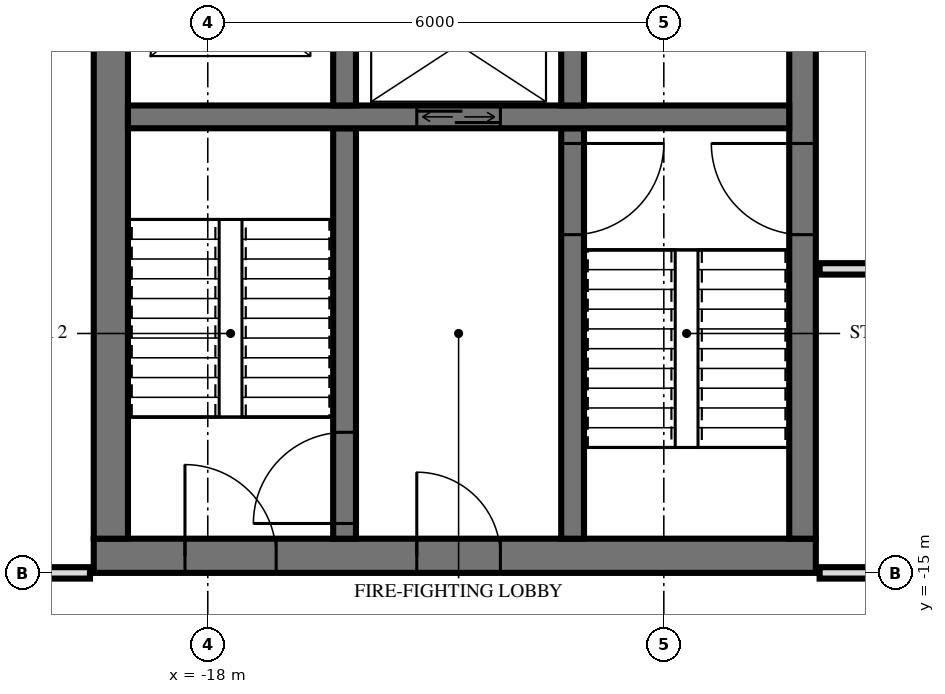
"""IFC4 building model, lengths in metres.
Left out: names, types, materials, properties, quantities, classifications, styles, units other than length and angle.
Written with IfcOpenShell. Run it as: python <this file> out.ifc"""

import sys

from ifc_helpers import new_model, si_unit, direction, frame, frame_2d, origin, place, context, subcontext, project, spatial, rectangle, extrude, element, fill, save


model = new_model("IFC4")
c1 = context("Model", 3, precision=1e-05, world=origin(), true_north=direction((0.0, 1.0)))
c2 = subcontext(c1, "Body", "Model", "MODEL_VIEW")
j1 = project(units=[si_unit("LENGTHUNIT", "METRE"), si_unit("PLANEANGLEUNIT", "RADIAN")], contexts=[c1])
p1 = place(None, origin())
s1 = spatial("IfcSite", under=j1, at=p1, CompositionType="ELEMENT")
p2 = place(p1, origin())
s2 = spatial("IfcBuilding", under=s1, at=p2, CompositionType="ELEMENT")
p3 = place(p2, frame((0.0, 0.0, 326.6)))
s3 = spatial("IfcBuildingStorey", under=s2, at=p3, CompositionType="ELEMENT", Elevation=326.6)
p4 = place(p3, frame((-19.5, -14.775, 0.0), z_axis=(0.0, 0.0, 1.0), x_axis=(1.0, 0.0, 0.0)))
e1 = element("IfcWall", 1, at=p4, inside=s3, PredefinedType="SHEAR", context=c2, shape_type="SweptSolid", body=[
    extrude(rectangle(XDim=9.5, YDim=0.45, at=frame_2d((4.75, 0.0))), origin(), (0.0, 0.0, 1.0), 4.0),
])
p5 = place(p4, frame((1.2, 0.0, 0.0)))
e2 = element("IfcOpeningElement", 2, at=p5, cuts=e1, PredefinedType="OPENING", context=c2, shape_type="SweptSolid", body=[
    extrude(rectangle(XDim=1.2, YDim=2.1, at=frame_2d((0.6, 1.05))), frame((0.0, 0.235, 0.0), z_axis=(0.0, -1.0, 0.0), x_axis=(1.0, 0.0, 0.0)), (0.0, 0.0, 1.0), 0.47),
])
p6 = place(p4, frame((4.25, 0.0, 0.0)))
e3 = element("IfcOpeningElement", 3, at=p6, cuts=e1, PredefinedType="OPENING", context=c2, shape_type="SweptSolid", body=[
    extrude(rectangle(XDim=1.1, YDim=2.1, at=frame_2d((0.55, 1.05))), frame((0.0, 0.235, 0.0), z_axis=(0.0, -1.0, 0.0), x_axis=(1.0, 0.0, 0.0)), (0.0, 0.0, 1.0), 0.47),
])
p7 = place(p3, frame((-10.175, -14.55, 0.0), z_axis=(0.0, 0.0, 1.0), x_axis=(0.0, 1.0, 0.0)))
e4 = element("IfcWall", 4, at=p7, inside=s3, PredefinedType="SHEAR", context=c2, shape_type="SweptSolid", body=[
    extrude(rectangle(XDim=14.1, YDim=0.35, at=frame_2d((7.05, 0.0))), origin(), (0.0, 0.0, 1.0), 4.0),
])
p8 = place(p7, frame((8.4, 0.0, 0.0)))
e5 = element("IfcOpeningElement", 5, at=p8, cuts=e4, PredefinedType="OPENING", context=c2, shape_type="SweptSolid", body=[
    extrude(rectangle(XDim=1.4, YDim=2.4, at=frame_2d((0.7, 1.2))), frame((0.0, 0.185, 0.0), z_axis=(0.0, -1.0, 0.0), x_axis=(1.0, 0.0, 0.0)), (0.0, 0.0, 1.0), 0.37),
])
p9 = place(p7, frame((10.0, 0.0, 0.0)))
e6 = element("IfcOpeningElement", 6, at=p9, cuts=e4, PredefinedType="OPENING", context=c2, shape_type="SweptSolid", body=[
    extrude(rectangle(XDim=1.4, YDim=2.4, at=frame_2d((0.7, 1.2))), frame((0.0, 0.185, 0.0), z_axis=(0.0, -1.0, 0.0), x_axis=(1.0, 0.0, 0.0)), (0.0, 0.0, 1.0), 0.37),
])
p10 = place(p7, frame((4.0, 0.0, 0.0)))
e7 = element("IfcOpeningElement", 7, at=p10, cuts=e4, PredefinedType="OPENING", context=c2, shape_type="SweptSolid", body=[
    extrude(rectangle(XDim=1.2, YDim=2.1, at=frame_2d((0.6, 1.05))), frame((0.0, 0.185, 0.0), z_axis=(0.0, -1.0, 0.0), x_axis=(1.0, 0.0, 0.0)), (0.0, 0.0, 1.0), 0.37),
])
p11 = place(p3, frame((-19.275, -14.55, 0.0), z_axis=(0.0, 0.0, 1.0), x_axis=(0.0, 1.0, 0.0)))
e8 = element("IfcWall", 8, at=p11, inside=s3, PredefinedType="SHEAR", context=c2, shape_type="SweptSolid", body=[
    extrude(rectangle(XDim=14.1, YDim=0.45, at=frame_2d((7.05, 0.0))), origin(), (0.0, 0.0, 1.0), 4.0),
])
p12 = place(p3, frame((-19.05, -9.0, 0.0), z_axis=(0.0, 0.0, 1.0), x_axis=(1.0, 0.0, 0.0)))
e9 = element("IfcWall", 9, at=p12, inside=s3, PredefinedType="SHEAR", context=c2, shape_type="SweptSolid", body=[
    extrude(rectangle(XDim=8.7, YDim=0.3, at=frame_2d((4.35, 0.0))), origin(), (0.0, 0.0, 1.0), 4.0),
])
p13 = place(p12, frame((3.8, 0.0, 0.0)))
e10 = element("IfcOpeningElement", 10, at=p13, cuts=e9, PredefinedType="OPENING", context=c2, shape_type="SweptSolid", body=[
    extrude(rectangle(XDim=1.1, YDim=2.1, at=frame_2d((0.55, 1.05))), frame((0.0, 0.16, 0.0), z_axis=(0.0, -1.0, 0.0), x_axis=(1.0, 0.0, 0.0)), (0.0, 0.0, 1.0), 0.32),
])
p14 = place(p3, frame((-13.2, -8.85, 0.0), z_axis=(0.0, 0.0, 1.0), x_axis=(0.0, 1.0, 0.0)))
e11 = element("IfcWall", 11, at=p14, inside=s3, PredefinedType="SHEAR", context=c2, shape_type="SweptSolid", body=[
    extrude(rectangle(XDim=2.3, YDim=0.3, at=frame_2d((1.15, 0.0))), origin(), (0.0, 0.0, 1.0), 4.0),
])
p15 = place(p3, frame((-13.2, -14.55, 0.0), z_axis=(0.0, 0.0, 1.0), x_axis=(0.0, 1.0, 0.0)))
e12 = element("IfcWall", 12, at=p15, inside=s3, PredefinedType="SHEAR", context=c2, shape_type="SweptSolid", body=[
    extrude(rectangle(XDim=5.4, YDim=0.3, at=frame_2d((2.7, 0.0))), origin(), (0.0, 0.0, 1.0), 4.0),
])
p16 = place(p15, frame((4.0, 0.0, 0.0)))
e13 = element("IfcOpeningElement", 13, at=p16, cuts=e12, PredefinedType="OPENING", context=c2, shape_type="SweptSolid", body=[
    extrude(rectangle(XDim=1.2, YDim=2.1, at=frame_2d((0.6, 1.05))), frame((0.0, 0.16, 0.0), z_axis=(0.0, -1.0, 0.0), x_axis=(1.0, 0.0, 0.0)), (0.0, 0.0, 1.0), 0.32),
])
p17 = place(p3, frame((-16.2, -8.85, 0.0), z_axis=(0.0, 0.0, 1.0), x_axis=(0.0, 1.0, 0.0)))
e14 = element("IfcWall", 14, at=p17, inside=s3, PredefinedType="SHEAR", context=c2, shape_type="SweptSolid", body=[
    extrude(rectangle(XDim=2.3, YDim=0.3, at=frame_2d((1.15, 0.0))), origin(), (0.0, 0.0, 1.0), 4.0),
])
p18 = place(p3, frame((-16.2, -14.55, 0.0), z_axis=(0.0, 0.0, 1.0), x_axis=(0.0, 1.0, 0.0)))
e15 = element("IfcWall", 15, at=p18, inside=s3, PredefinedType="SHEAR", context=c2, shape_type="SweptSolid", body=[
    extrude(rectangle(XDim=5.4, YDim=0.3, at=frame_2d((2.7, 0.0))), origin(), (0.0, 0.0, 1.0), 4.0),
])
p19 = place(p18, frame((0.2, 0.0, 0.0)))
e16 = element("IfcOpeningElement", 16, at=p19, cuts=e15, PredefinedType="OPENING", context=c2, shape_type="SweptSolid", body=[
    extrude(rectangle(XDim=1.2, YDim=2.1, at=frame_2d((0.6, 1.05))), frame((0.0, 0.16, 0.0), z_axis=(0.0, -1.0, 0.0), x_axis=(1.0, 0.0, 0.0)), (0.0, 0.0, 1.0), 0.32),
])
p20 = place(p3, frame((-21.935, -15.0, 0.0), z_axis=(0.0, 0.0, 1.0), x_axis=(1.0, 0.0, 0.0)))
e17 = element("IfcWall", 17, at=p20, inside=s3, PredefinedType="PARTITIONING", context=c2, shape_type="SweptSolid", body=[
    extrude(rectangle(XDim=2.385, YDim=0.15, at=frame_2d((1.192, 0.0))), origin(), (0.0, 0.0, 1.0), 3.72),
])
p21 = place(p20, frame((0.627, 0.0, 0.0)))
e18 = element("IfcOpeningElement", 18, at=p21, cuts=e17, PredefinedType="OPENING", context=c2, shape_type="SweptSolid", body=[
    extrude(rectangle(XDim=1.0, YDim=2.1, at=frame_2d((0.5, 1.05))), frame((0.0, 0.085, 0.0), z_axis=(0.0, -1.0, 0.0), x_axis=(1.0, 0.0, 0.0)), (0.0, 0.0, 1.0), 0.17),
])
p22 = place(p3, frame((-9.95, -15.0, 0.0), z_axis=(0.0, 0.0, 1.0), x_axis=(1.0, 0.0, 0.0)))
e19 = element("IfcWall", 19, at=p22, inside=s3, PredefinedType="PARTITIONING", context=c2, shape_type="SweptSolid", body=[
    extrude(rectangle(XDim=2.642, YDim=0.15, at=frame_2d((1.321, 0.0))), origin(), (0.0, 0.0, 1.0), 3.084),
])
p23 = place(p3, frame((-9.95, -11.0, 0.0), z_axis=(0.0, 0.0, 1.0), x_axis=(1.0, 0.0, 0.0)))
e20 = element("IfcWall", 20, at=p23, inside=s3, PredefinedType="PARTITIONING", context=c2, shape_type="SweptSolid", body=[
    extrude(rectangle(XDim=19.9, YDim=0.15, at=frame_2d((9.95, 0.0))), origin(), (0.0, 0.0, 1.0), 3.72),
])
p24 = place(p23, frame((9.45, 0.0, 0.0)))
e21 = element("IfcOpeningElement", 21, at=p24, cuts=e20, PredefinedType="OPENING", context=c2, shape_type="SweptSolid", body=[
    extrude(rectangle(XDim=1.0, YDim=2.1, at=frame_2d((0.5, 1.05))), frame((0.0, 0.085, 0.0), z_axis=(0.0, -1.0, 0.0), x_axis=(1.0, 0.0, 0.0)), (0.0, 0.0, 1.0), 0.17),
])
p25 = place(p23, frame((2.2, 0.0, 0.0)))
e22 = element("IfcOpeningElement", 22, at=p25, cuts=e20, PredefinedType="OPENING", context=c2, shape_type="SweptSolid", body=[
    extrude(rectangle(XDim=1.0, YDim=2.1, at=frame_2d((0.5, 1.05))), frame((0.0, 0.085, 0.0), z_axis=(0.0, -1.0, 0.0), x_axis=(1.0, 0.0, 0.0)), (0.0, 0.0, 1.0), 0.17),
])
p26 = place(p13, origin())
e23 = element("IfcDoor", 23, at=p26, inside=s3, OperationType="DOUBLE_DOOR_SLIDING", PredefinedType="USERDEFINED", context=c2, shape_type="SweptSolid", body=[
    extrude(rectangle(XDim=1.1, YDim=2.1, at=frame_2d((0.55, 1.05))), frame((0.0, 0.025, 0.0), z_axis=(0.0, -1.0, 0.0), x_axis=(1.0, 0.0, 0.0)), (0.0, 0.0, 1.0), 0.05),
])
fill(e10, e23)
p27 = place(p10, origin())
e24 = element("IfcDoor", 24, at=p27, inside=s3, OperationType="SINGLE_SWING_LEFT", PredefinedType="DOOR", context=c2, shape_type="SweptSolid", body=[
    extrude(rectangle(XDim=1.2, YDim=2.1, at=frame_2d((0.6, 1.05))), frame((0.0, 0.025, 0.0), z_axis=(0.0, -1.0, 0.0), x_axis=(1.0, 0.0, 0.0)), (0.0, 0.0, 1.0), 0.05),
])
fill(e7, e24)
p28 = place(p5, origin())
e25 = element("IfcDoor", 25, at=p28, inside=s3, OperationType="SINGLE_SWING_RIGHT", PredefinedType="DOOR", context=c2, shape_type="SweptSolid", body=[
    extrude(rectangle(XDim=1.2, YDim=2.1, at=frame_2d((0.6, 1.05))), frame((0.0, 0.025, 0.0), z_axis=(0.0, -1.0, 0.0), x_axis=(1.0, 0.0, 0.0)), (0.0, 0.0, 1.0), 0.05),
])
fill(e2, e25)
p29 = place(p6, origin())
e26 = element("IfcDoor", 26, at=p29, inside=s3, OperationType="SINGLE_SWING_RIGHT", PredefinedType="DOOR", context=c2, shape_type="SweptSolid", body=[
    extrude(rectangle(XDim=1.1, YDim=2.1, at=frame_2d((0.55, 1.05))), frame((0.0, 0.025, 0.0), z_axis=(0.0, -1.0, 0.0), x_axis=(1.0, 0.0, 0.0)), (0.0, 0.0, 1.0), 0.05),
])
fill(e3, e26)
p30 = place(p16, frame((0.6, 0.0, 0.0), z_axis=(0.0, 0.0, 1.0), x_axis=(-1.0, 0.0, 0.0)))
e27 = element("IfcDoor", 27, at=p30, inside=s3, OperationType="SINGLE_SWING_RIGHT", PredefinedType="DOOR", context=c2, shape_type="SweptSolid", body=[
    extrude(rectangle(XDim=1.2, YDim=2.1, at=frame_2d((0.0, 1.05))), frame((0.0, -0.025, 0.0), z_axis=(0.0, 1.0, 0.0), x_axis=(-1.0, 0.0, 0.0)), (0.0, 0.0, 1.0), 0.05),
])
fill(e13, e27)
p31 = place(p19, origin())
e28 = element("IfcDoor", 28, at=p31, inside=s3, OperationType="SINGLE_SWING_RIGHT", PredefinedType="DOOR", context=c2, shape_type="SweptSolid", body=[
    extrude(rectangle(XDim=1.2, YDim=2.1, at=frame_2d((0.6, 1.05))), frame((0.0, 0.025, 0.0), z_axis=(0.0, -1.0, 0.0), x_axis=(1.0, 0.0, 0.0)), (0.0, 0.0, 1.0), 0.05),
])
fill(e16, e28)
save(model, sys.argv[1])
